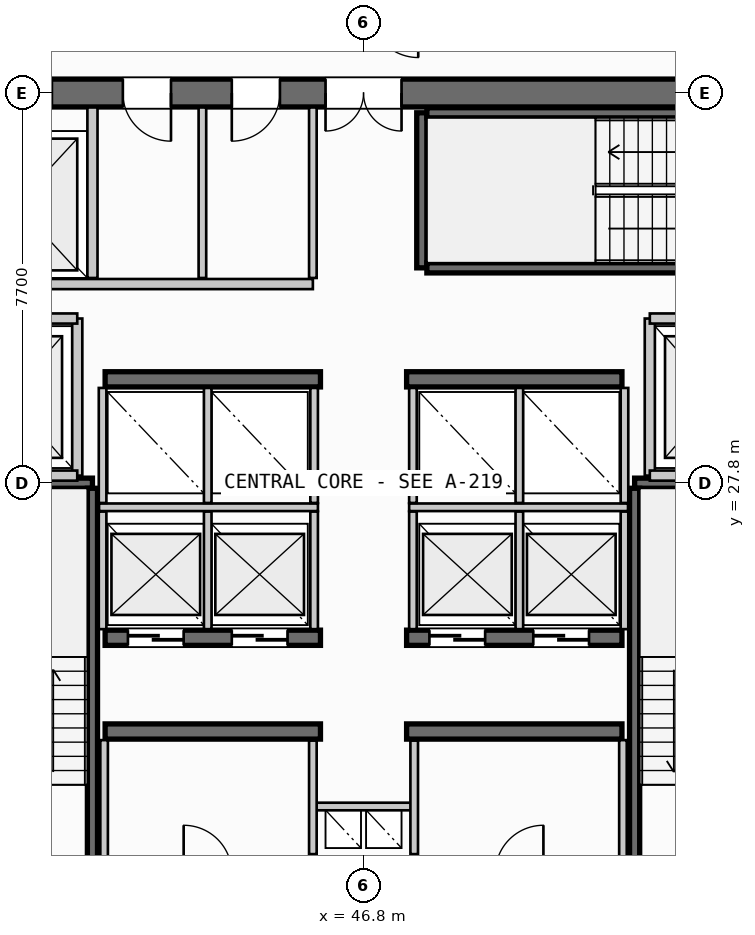
"""IFC4 building model, lengths in metres.
Left out: names, types, materials, properties, quantities, classifications, styles, units other than length and angle.
Written with IfcOpenShell. Run it as: python <this file> out.ifc"""

import sys

from ifc_helpers import new_model, si_unit, direction, frame, frame_2d, origin, place, context, subcontext, project, spatial, rectangle, extrude, source, transform, mapped, element, fill, save


model = new_model("IFC4")
c1 = context("Model", 3, precision=1e-05, world=origin(), true_north=direction((0.0, 1.0)))
c2 = subcontext(c1, "Body", "Model", "MODEL_VIEW")
j1 = project(units=[si_unit("LENGTHUNIT", "METRE"), si_unit("PLANEANGLEUNIT", "RADIAN")], contexts=[c1])
p1 = place(None, origin())
s1 = spatial("IfcSite", under=j1, at=p1, CompositionType="ELEMENT")
p2 = place(p1, origin())
s2 = spatial("IfcBuilding", under=s1, at=p2, CompositionType="ELEMENT")
p3 = place(p2, frame((0.0, 0.0, 139.45)))
s3 = spatial("IfcBuildingStorey", under=s2, at=p3, CompositionType="ELEMENT", Elevation=139.45)
p4 = place(p3, frame((55.6, 35.5, 0.0), z_axis=(0.0, 0.0, 1.0), x_axis=(-1.0, 0.0, 0.0)))
e1 = element("IfcWall", 1, at=p4, inside=s3, PredefinedType="SHEAR", context=c2, shape_type="SweptSolid", body=[
    extrude(rectangle(XDim=17.6, YDim=0.55, at=frame_2d((8.8, 0.0))), origin(), (0.0, 0.0, 1.0), 3.3),
])
p5 = place(p4, frame((8.05, 0.0, 0.0)))
e2 = element("IfcOpeningElement", 2, at=p5, cuts=e1, PredefinedType="OPENING", context=c2, shape_type="SweptSolid", body=[
    extrude(rectangle(XDim=1.5, YDim=2.2, at=frame_2d((0.75, 1.1))), frame((0.0, 0.285, 0.0), z_axis=(0.0, -1.0, 0.0), x_axis=(1.0, 0.0, 0.0)), (0.0, 0.0, 1.0), 0.57),
])
p6 = place(p4, frame((14.95, 0.0, 0.0)))
e3 = element("IfcOpeningElement", 3, at=p6, cuts=e1, PredefinedType="OPENING", context=c2, shape_type="SweptSolid", body=[
    extrude(rectangle(XDim=1.4, YDim=2.3, at=frame_2d((0.7, 1.15))), frame((0.0, 0.285, 0.0), z_axis=(0.0, -1.0, 0.0), x_axis=(1.0, 0.0, 0.0)), (0.0, 0.0, 1.0), 0.57),
])
p7 = place(p4, frame((12.6, 0.0, 0.0)))
e4 = element("IfcOpeningElement", 4, at=p7, cuts=e1, PredefinedType="OPENING", context=c2, shape_type="SweptSolid", body=[
    extrude(rectangle(XDim=0.95, YDim=2.15, at=frame_2d((0.475, 1.075))), frame((0.0, 0.285, 0.0), z_axis=(0.0, -1.0, 0.0), x_axis=(1.0, 0.0, 0.0)), (0.0, 0.0, 1.0), 0.57),
])
p8 = place(p4, frame((10.45, 0.0, 0.0)))
e5 = element("IfcOpeningElement", 5, at=p8, cuts=e1, PredefinedType="OPENING", context=c2, shape_type="SweptSolid", body=[
    extrude(rectangle(XDim=0.95, YDim=2.15, at=frame_2d((0.475, 1.075))), frame((0.0, 0.285, 0.0), z_axis=(0.0, -1.0, 0.0), x_axis=(1.0, 0.0, 0.0)), (0.0, 0.0, 1.0), 0.57),
])
for number, where, z_axis, x_axis in (
    (6, (41.7, 22.9, 0.0), (0.0, 0.0, 1.0), (1.0, 0.0, 0.0)),
    (7, (47.65, 22.9, 0.0), (0.0, 0.0, 1.0), (1.0, 0.0, 0.0)),
):
    element("IfcWall", number, at=place(p3, frame(where, z_axis=z_axis, x_axis=x_axis)), inside=s3, PredefinedType="SHEAR", context=c2, shape_type="SweptSolid", body=[
        extrude(rectangle(XDim=4.25, YDim=0.3, at=frame_2d((2.125, 0.0))), origin(), (0.0, 0.0, 1.0), 3.3),
    ])
p9 = place(p3, frame((41.7, 24.75, 0.0), z_axis=(0.0, 0.0, 1.0), x_axis=(1.0, 0.0, 0.0)))
e8 = element("IfcWall", 8, at=p9, inside=s3, PredefinedType="SHEAR", context=c2, shape_type="SweptSolid", body=[
    extrude(rectangle(XDim=4.25, YDim=0.3, at=frame_2d((2.125, 0.0))), origin(), (0.0, 0.0, 1.0), 3.3),
])
p10 = place(p9, frame((0.45, 0.0, 0.0)))
e9 = element("IfcOpeningElement", 9, at=p10, cuts=e8, PredefinedType="OPENING", context=c2, shape_type="SweptSolid", body=[
    extrude(rectangle(XDim=1.1, YDim=2.2, at=frame_2d((0.55, 1.1))), frame((0.0, 0.16, 0.0), z_axis=(0.0, -1.0, 0.0), x_axis=(1.0, 0.0, 0.0)), (0.0, 0.0, 1.0), 0.32),
])
p11 = place(p9, frame((2.5, 0.0, 0.0)))
e10 = element("IfcOpeningElement", 10, at=p11, cuts=e8, PredefinedType="OPENING", context=c2, shape_type="SweptSolid", body=[
    extrude(rectangle(XDim=1.1, YDim=2.2, at=frame_2d((0.55, 1.1))), frame((0.0, 0.16, 0.0), z_axis=(0.0, -1.0, 0.0), x_axis=(1.0, 0.0, 0.0)), (0.0, 0.0, 1.0), 0.32),
])
p12 = place(p3, frame((47.65, 24.75, 0.0), z_axis=(0.0, 0.0, 1.0), x_axis=(1.0, 0.0, 0.0)))
e11 = element("IfcWall", 11, at=p12, inside=s3, PredefinedType="SHEAR", context=c2, shape_type="SweptSolid", body=[
    extrude(rectangle(XDim=4.25, YDim=0.3, at=frame_2d((2.125, 0.0))), origin(), (0.0, 0.0, 1.0), 3.3),
])
p13 = place(p12, frame((0.45, 0.0, 0.0)))
e12 = element("IfcOpeningElement", 12, at=p13, cuts=e11, PredefinedType="OPENING", context=c2, shape_type="SweptSolid", body=[
    extrude(rectangle(XDim=1.1, YDim=2.2, at=frame_2d((0.55, 1.1))), frame((0.0, 0.16, 0.0), z_axis=(0.0, -1.0, 0.0), x_axis=(1.0, 0.0, 0.0)), (0.0, 0.0, 1.0), 0.32),
])
p14 = place(p12, frame((2.5, 0.0, 0.0)))
e13 = element("IfcOpeningElement", 13, at=p14, cuts=e11, PredefinedType="OPENING", context=c2, shape_type="SweptSolid", body=[
    extrude(rectangle(XDim=1.1, YDim=2.2, at=frame_2d((0.55, 1.1))), frame((0.0, 0.16, 0.0), z_axis=(0.0, -1.0, 0.0), x_axis=(1.0, 0.0, 0.0)), (0.0, 0.0, 1.0), 0.32),
])
for number, where, z_axis, x_axis in (
    (14, (41.7, 29.85, 0.0), (0.0, 0.0, 1.0), (1.0, 0.0, 0.0)),
    (15, (47.65, 29.85, 0.0), (0.0, 0.0, 1.0), (1.0, 0.0, 0.0)),
):
    element("IfcWall", number, at=place(p3, frame(where, z_axis=z_axis, x_axis=x_axis)), inside=s3, PredefinedType="SHEAR", context=c2, shape_type="SweptSolid", body=[
        extrude(rectangle(XDim=4.25, YDim=0.3, at=frame_2d((2.125, 0.0))), origin(), (0.0, 0.0, 1.0), 3.3),
    ])
p15 = place(p3, frame((38.39, 27.8, 0.0), z_axis=(0.0, 0.0, 1.0), x_axis=(1.0, 0.0, 0.0)))
e16 = element("IfcWall", 16, at=p15, inside=s3, PredefinedType="SHEAR", context=c2, shape_type="SweptSolid", body=[
    extrude(rectangle(XDim=3.06, YDim=0.2, at=frame_2d((1.53, 0.0))), origin(), (0.0, 0.0, 1.0), 3.3),
])
p16 = place(p3, frame((41.45, 27.7, 0.0), z_axis=(0.0, 0.0, 1.0), x_axis=(0.0, -1.0, 0.0)))
e17 = element("IfcWall", 17, at=p16, inside=s3, PredefinedType="SHEAR", context=c2, shape_type="SweptSolid", body=[
    extrude(rectangle(XDim=7.35, YDim=0.2, at=frame_2d((3.675, 0.0))), origin(), (0.0, 0.0, 1.0), 3.3),
])
p17 = place(p3, frame((52.15, 27.8, 0.0), z_axis=(0.0, 0.0, 1.0), x_axis=(1.0, 0.0, 0.0)))
e18 = element("IfcWall", 18, at=p17, inside=s3, PredefinedType="SHEAR", context=c2, shape_type="SweptSolid", body=[
    extrude(rectangle(XDim=3.06, YDim=0.2, at=frame_2d((1.53, 0.0))), origin(), (0.0, 0.0, 1.0), 3.3),
])
p18 = place(p3, frame((52.15, 20.35, 0.0), z_axis=(0.0, 0.0, 1.0), x_axis=(0.0, 1.0, 0.0)))
e19 = element("IfcWall", 19, at=p18, inside=s3, PredefinedType="SHEAR", context=c2, shape_type="SweptSolid", body=[
    extrude(rectangle(XDim=7.35, YDim=0.2, at=frame_2d((3.675, 0.0))), origin(), (0.0, 0.0, 1.0), 3.3),
])
p19 = place(p3, frame((47.95, 32.05, 0.0), z_axis=(0.0, 0.0, 1.0), x_axis=(0.0, 1.0, 0.0)))
e20 = element("IfcWall", 20, at=p19, inside=s3, PredefinedType="SHEAR", context=c2, shape_type="SweptSolid", body=[
    extrude(rectangle(XDim=3.06, YDim=0.2, at=frame_2d((1.53, 0.0))), origin(), (0.0, 0.0, 1.0), 3.3),
])
for number, where, z_axis, x_axis in (
    (21, (48.05, 35.11, 0.0), (0.0, 0.0, 1.0), (1.0, 0.0, 0.0)),
    (22, (55.4, 32.05, 0.0), (0.0, 0.0, 1.0), (-1.0, 0.0, 0.0)),
):
    element("IfcWall", number, at=place(p3, frame(where, z_axis=z_axis, x_axis=x_axis)), inside=s3, PredefinedType="SHEAR", context=c2, shape_type="SweptSolid", body=[
        extrude(rectangle(XDim=7.35, YDim=0.2, at=frame_2d((3.675, 0.0))), origin(), (0.0, 0.0, 1.0), 3.3),
    ])
p20 = place(p3, frame((45.8, 21.42, 0.0), z_axis=(0.0, 0.0, 1.0), x_axis=(1.0, 0.0, 0.0)))
e23 = element("IfcWall", 23, at=p20, inside=s3, PredefinedType="PARTITIONING", context=c2, shape_type="SweptSolid", body=[
    extrude(rectangle(XDim=2.0, YDim=0.15, at=frame_2d((1.0, 0.0))), origin(), (0.0, 0.0, 1.0), 2.305),
])
for number, where, z_axis, x_axis in (
    (24, (45.8, 20.48, 0.0), (0.0, 0.0, 1.0), (0.0, 1.0, 0.0)),
    (25, (47.8, 20.48, 0.0), (0.0, 0.0, 1.0), (0.0, 1.0, 0.0)),
):
    element("IfcWall", number, at=place(p3, frame(where, z_axis=z_axis, x_axis=x_axis)), inside=s3, PredefinedType="PARTITIONING", context=c2, shape_type="SweptSolid", body=[
        extrude(rectangle(XDim=2.24, YDim=0.15, at=frame_2d((1.12, 0.0))), origin(), (0.0, 0.0, 1.0), 2.305),
    ])
p21 = place(p3, frame((41.15, 27.95, 0.0), z_axis=(0.0, 0.0, 1.0), x_axis=(0.0, 1.0, 0.0)))
e26 = element("IfcWall", 26, at=p21, inside=s3, PredefinedType="PARTITIONING", context=c2, shape_type="SweptSolid", body=[
    extrude(rectangle(XDim=3.1, YDim=0.2, at=frame_2d((1.55, 0.0))), origin(), (0.0, 0.0, 1.0), 2.305),
])
for number, where, z_axis, x_axis in (
    (27, (38.285, 27.95, 0.0), (0.0, 0.0, 1.0), (1.0, 0.0, 0.0)),
    (28, (38.285, 31.05, 0.0), (0.0, 0.0, 1.0), (1.0, 0.0, 0.0)),
):
    element("IfcWall", number, at=place(p3, frame(where, z_axis=z_axis, x_axis=x_axis)), inside=s3, PredefinedType="PARTITIONING", context=c2, shape_type="SweptSolid", body=[
        extrude(rectangle(XDim=2.865, YDim=0.2, at=frame_2d((1.433, 0.0))), origin(), (0.0, 0.0, 1.0), 2.305),
    ])
p22 = place(p3, frame((52.45, 27.95, 0.0), z_axis=(0.0, 0.0, 1.0), x_axis=(0.0, 1.0, 0.0)))
e29 = element("IfcWall", 29, at=p22, inside=s3, PredefinedType="PARTITIONING", context=c2, shape_type="SweptSolid", body=[
    extrude(rectangle(XDim=3.1, YDim=0.2, at=frame_2d((1.55, 0.0))), origin(), (0.0, 0.0, 1.0), 2.305),
])
for number, where, z_axis, x_axis in (
    (30, (52.45, 27.95, 0.0), (0.0, 0.0, 1.0), (1.0, 0.0, 0.0)),
    (31, (52.45, 31.05, 0.0), (0.0, 0.0, 1.0), (1.0, 0.0, 0.0)),
):
    element("IfcWall", number, at=place(p3, frame(where, z_axis=z_axis, x_axis=x_axis)), inside=s3, PredefinedType="PARTITIONING", context=c2, shape_type="SweptSolid", body=[
        extrude(rectangle(XDim=2.865, YDim=0.2, at=frame_2d((1.433, 0.0))), origin(), (0.0, 0.0, 1.0), 2.305),
    ])
for number, where, z_axis, x_axis in (
    (32, (41.68, 20.385, 0.0), (0.0, 0.0, 1.0), (0.0, 1.0, 0.0)),
    (33, (51.92, 20.385, 0.0), (0.0, 0.0, 1.0), (0.0, 1.0, 0.0)),
):
    element("IfcWall", number, at=place(p3, frame(where, z_axis=z_axis, x_axis=x_axis)), inside=s3, PredefinedType="PARTITIONING", context=c2, shape_type="SweptSolid", body=[
        extrude(rectangle(XDim=2.345, YDim=0.15, at=frame_2d((1.172, 0.0))), origin(), (0.0, 0.0, 1.0), 2.305),
    ])
p23 = place(p3, frame((41.58, 27.325, 0.0), z_axis=(0.0, 0.0, 1.0), x_axis=(1.0, 0.0, 0.0)))
e34 = element("IfcWall", 34, at=p23, inside=s3, PredefinedType="PARTITIONING", context=c2, shape_type="SweptSolid", body=[
    extrude(rectangle(XDim=4.32, YDim=0.15, at=frame_2d((2.16, 0.0))), origin(), (0.0, 0.0, 1.0), 2.305),
])
p24 = place(p3, frame((47.7, 27.325, 0.0), z_axis=(0.0, 0.0, 1.0), x_axis=(1.0, 0.0, 0.0)))
e35 = element("IfcWall", 35, at=p24, inside=s3, PredefinedType="PARTITIONING", context=c2, shape_type="SweptSolid", body=[
    extrude(rectangle(XDim=4.32, YDim=0.15, at=frame_2d((2.16, 0.0))), origin(), (0.0, 0.0, 1.0), 2.305),
])
for number, where, z_axis, x_axis in (
    (36, (41.65, 24.92, 0.0), (0.0, 0.0, 1.0), (0.0, 1.0, 0.0)),
    (37, (43.725, 24.92, 0.0), (0.0, 0.0, 1.0), (0.0, 1.0, 0.0)),
    (38, (45.825, 24.92, 0.0), (0.0, 0.0, 1.0), (0.0, 1.0, 0.0)),
    (39, (47.775, 24.92, 0.0), (0.0, 0.0, 1.0), (0.0, 1.0, 0.0)),
    (40, (49.875, 24.92, 0.0), (0.0, 0.0, 1.0), (0.0, 1.0, 0.0)),
    (41, (51.95, 24.92, 0.0), (0.0, 0.0, 1.0), (0.0, 1.0, 0.0)),
):
    element("IfcWall", number, at=place(p3, frame(where, z_axis=z_axis, x_axis=x_axis)), inside=s3, PredefinedType="PARTITIONING", context=c2, shape_type="SweptSolid", body=[
        extrude(rectangle(XDim=2.32, YDim=0.15, at=frame_2d((1.16, 0.0))), origin(), (0.0, 0.0, 1.0), 2.305),
    ])
for number, where, z_axis, x_axis in (
    (42, (41.65, 27.41, 0.0), (0.0, 0.0, 1.0), (0.0, 1.0, 0.0)),
    (43, (43.725, 27.41, 0.0), (0.0, 0.0, 1.0), (0.0, 1.0, 0.0)),
    (44, (45.825, 27.41, 0.0), (0.0, 0.0, 1.0), (0.0, 1.0, 0.0)),
    (45, (47.775, 27.41, 0.0), (0.0, 0.0, 1.0), (0.0, 1.0, 0.0)),
    (46, (49.875, 27.41, 0.0), (0.0, 0.0, 1.0), (0.0, 1.0, 0.0)),
    (47, (51.95, 27.41, 0.0), (0.0, 0.0, 1.0), (0.0, 1.0, 0.0)),
):
    element("IfcWall", number, at=place(p3, frame(where, z_axis=z_axis, x_axis=x_axis)), inside=s3, PredefinedType="PARTITIONING", context=c2, shape_type="SweptSolid", body=[
        extrude(rectangle(XDim=2.27, YDim=0.15, at=frame_2d((1.135, 0.0))), origin(), (0.0, 0.0, 1.0), 2.305),
    ])
p25 = place(p3, frame((41.45, 31.85, 0.0), z_axis=(0.0, 0.0, 1.0), x_axis=(0.0, 1.0, 0.0)))
e48 = element("IfcWall", 48, at=p25, inside=s3, PredefinedType="PARTITIONING", context=c2, shape_type="SweptSolid", body=[
    extrude(rectangle(XDim=3.365, YDim=0.2, at=frame_2d((1.683, 0.0))), origin(), (0.0, 0.0, 1.0), 2.305),
])
p26 = place(p3, frame((38.285, 31.73, 0.0), z_axis=(0.0, 0.0, 1.0), x_axis=(1.0, 0.0, 0.0)))
e49 = element("IfcWall", 49, at=p26, inside=s3, PredefinedType="PARTITIONING", context=c2, shape_type="SweptSolid", body=[
    extrude(rectangle(XDim=7.515, YDim=0.2, at=frame_2d((3.758, 0.0))), origin(), (0.0, 0.0, 1.0), 2.305),
])
p27 = place(p3, frame((45.8, 31.85, 0.0), z_axis=(0.0, 0.0, 1.0), x_axis=(0.0, 1.0, 0.0)))
e50 = element("IfcWall", 50, at=p27, inside=s3, PredefinedType="PARTITIONING", context=c2, shape_type="SweptSolid", body=[
    extrude(rectangle(XDim=3.365, YDim=0.15, at=frame_2d((1.683, 0.0))), origin(), (0.0, 0.0, 1.0), 2.305),
])
p28 = place(p3, frame((43.62, 31.85, 0.0), z_axis=(0.0, 0.0, 1.0), x_axis=(0.0, 1.0, 0.0)))
e51 = element("IfcWall", 51, at=p28, inside=s3, PredefinedType="PLUMBINGWALL", context=c2, shape_type="SweptSolid", body=[
    extrude(rectangle(XDim=3.365, YDim=0.15, at=frame_2d((1.683, 0.0))), origin(), (0.0, 0.0, 1.0), 2.305),
])
m1 = source(origin(), c2, "Body", "SweptSolid", [
    extrude(rectangle(XDim=1.5, YDim=2.2, at=frame_2d((0.75, 1.1))), frame((0.0, 0.025, 0.0), z_axis=(0.0, -1.0, 0.0), x_axis=(1.0, 0.0, 0.0)), (0.0, 0.0, 1.0), 0.05),
])
p29 = place(p5, origin())
e52 = element("IfcDoor", 52, at=p29, inside=s3, OperationType="DOUBLE_DOOR_SINGLE_SWING", PredefinedType="DOOR", context=c2, shape_type="MappedRepresentation", body=[
    mapped(m1, transform((0.0, 0.0, 0.0), scale=1.0)),
])
fill(e2, e52)
m2 = source(origin(), c2, "Body", "SweptSolid", [
    extrude(rectangle(XDim=1.1, YDim=2.2, at=frame_2d((0.55, 1.1))), frame((0.0, 0.025, 0.0), z_axis=(0.0, -1.0, 0.0), x_axis=(1.0, 0.0, 0.0)), (0.0, 0.0, 1.0), 0.05),
])
p30 = place(p10, origin())
e53 = element("IfcDoor", 53, at=p30, inside=s3, OperationType="SLIDING_TO_RIGHT", PredefinedType="DOOR", context=c2, shape_type="MappedRepresentation", body=[
    mapped(m2, transform((0.0, 0.0, 0.0), scale=1.0)),
])
fill(e9, e53)
p31 = place(p11, origin())
e54 = element("IfcDoor", 54, at=p31, inside=s3, OperationType="SLIDING_TO_RIGHT", PredefinedType="DOOR", context=c2, shape_type="MappedRepresentation", body=[
    mapped(m2, transform((0.0, 0.0, 0.0), scale=1.0)),
])
fill(e10, e54)
p32 = place(p13, origin())
e55 = element("IfcDoor", 55, at=p32, inside=s3, OperationType="SLIDING_TO_RIGHT", PredefinedType="DOOR", context=c2, shape_type="MappedRepresentation", body=[
    mapped(m2, transform((0.0, 0.0, 0.0), scale=1.0)),
])
fill(e12, e55)
p33 = place(p14, origin())
e56 = element("IfcDoor", 56, at=p33, inside=s3, OperationType="SLIDING_TO_RIGHT", PredefinedType="DOOR", context=c2, shape_type="MappedRepresentation", body=[
    mapped(m2, transform((0.0, 0.0, 0.0), scale=1.0)),
])
fill(e13, e56)
m3 = source(origin(), c2, "Body", "SweptSolid", [
    extrude(rectangle(XDim=1.4, YDim=2.3, at=frame_2d((0.7, 1.15))), frame((0.0, 0.025, 0.0), z_axis=(0.0, -1.0, 0.0), x_axis=(1.0, 0.0, 0.0)), (0.0, 0.0, 1.0), 0.05),
])
p34 = place(p6, origin())
e57 = element("IfcDoor", 57, at=p34, inside=s3, OperationType="SLIDING_TO_RIGHT", PredefinedType="DOOR", context=c2, shape_type="MappedRepresentation", body=[
    mapped(m3, transform((0.0, 0.0, 0.0), scale=1.0)),
])
fill(e3, e57)
m4 = source(origin(), c2, "Body", "SweptSolid", [
    extrude(rectangle(XDim=0.95, YDim=2.15, at=frame_2d((0.475, 1.075))), frame((0.0, 0.025, 0.0), z_axis=(0.0, -1.0, 0.0), x_axis=(1.0, 0.0, 0.0)), (0.0, 0.0, 1.0), 0.05),
])
p35 = place(p7, origin())
e58 = element("IfcDoor", 58, at=p35, inside=s3, OperationType="SINGLE_SWING_LEFT", PredefinedType="DOOR", context=c2, shape_type="MappedRepresentation", body=[
    mapped(m4, transform((0.0, 0.0, 0.0), scale=1.0)),
])
fill(e4, e58)
p36 = place(p8, origin())
e59 = element("IfcDoor", 59, at=p36, inside=s3, OperationType="SINGLE_SWING_RIGHT", PredefinedType="DOOR", context=c2, shape_type="MappedRepresentation", body=[
    mapped(m4, transform((0.0, 0.0, 0.0), scale=1.0)),
])
fill(e5, e59)
save(model, sys.argv[1])
